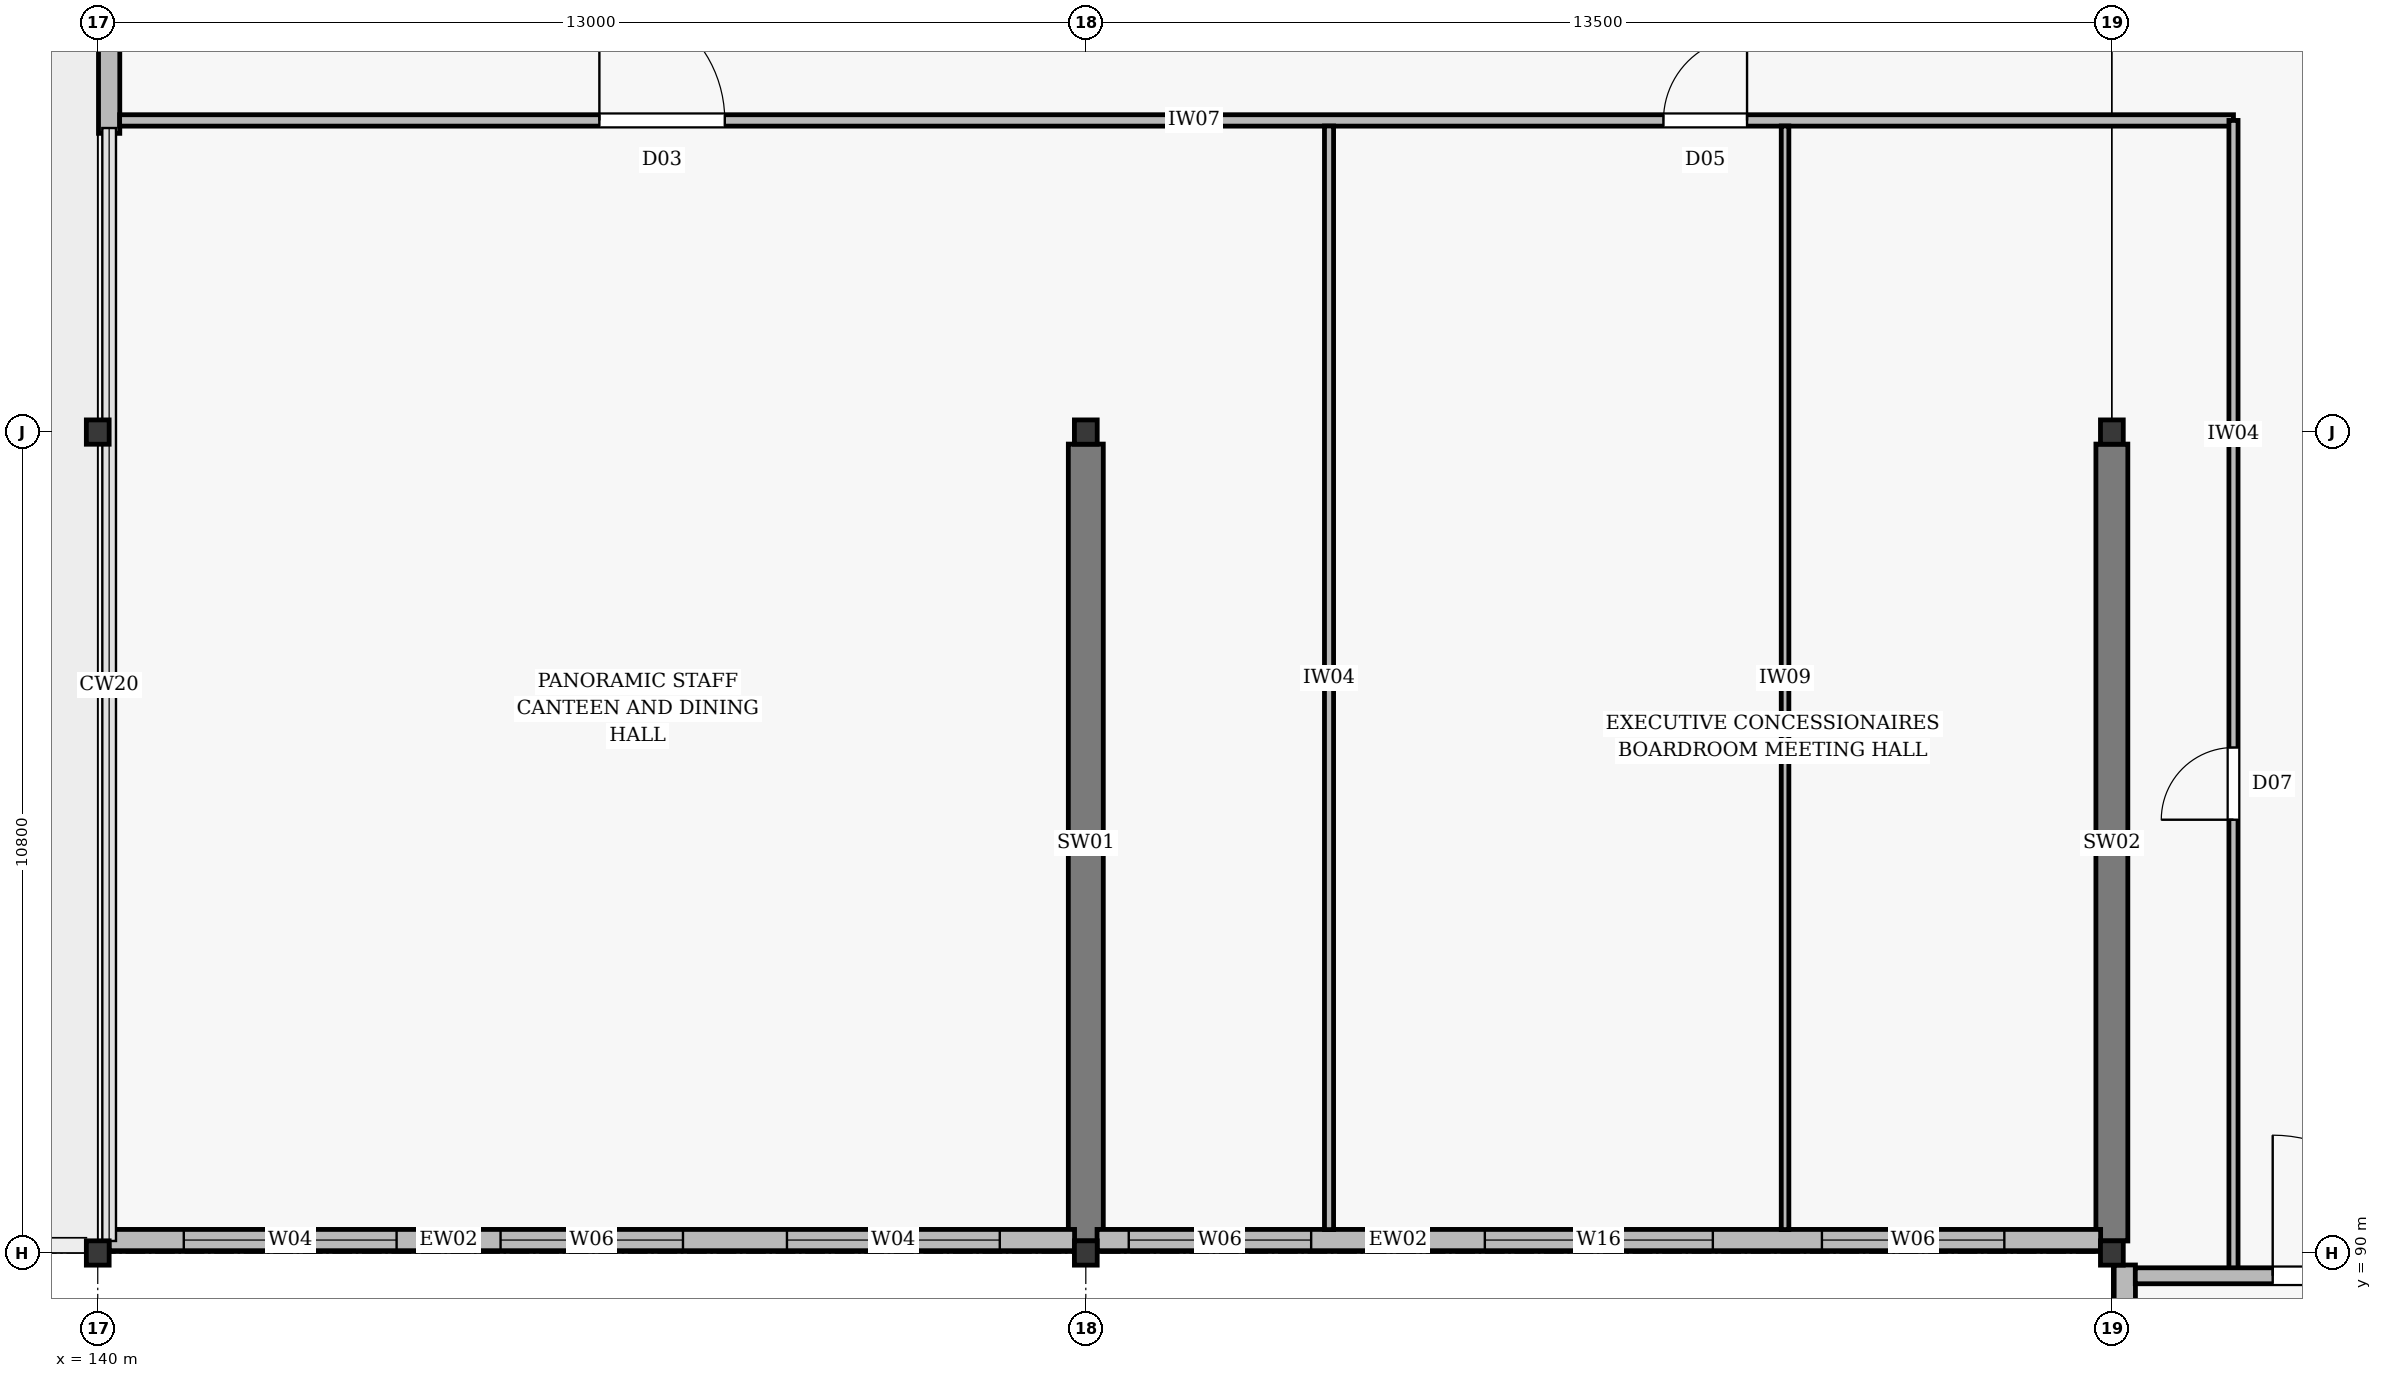
"""IFC4 building model, lengths in metres.
Left out: names, types, materials, properties, quantities, classifications, styles, units other than length and angle.
Written with IfcOpenShell. Run it as: python <this file> out.ifc"""

import sys

from ifc_helpers import new_model, si_unit, direction, frame, frame_2d, origin, origin_2d, place, context, subcontext, project, spatial, rectangle, i_section, extrude, element, fill, save


model = new_model("IFC4")
c1 = context("Model", 3, precision=1e-05, world=origin(), true_north=direction((0.0, 1.0)))
c2 = subcontext(c1, "Body", "Model", "MODEL_VIEW")
j1 = project(units=[si_unit("LENGTHUNIT", "METRE"), si_unit("PLANEANGLEUNIT", "RADIAN")], contexts=[c1])
p1 = place(None, origin())
s1 = spatial("IfcSite", under=j1, at=p1, CompositionType="ELEMENT")
p2 = place(p1, origin())
s2 = spatial("IfcBuilding", under=s1, at=p2, CompositionType="ELEMENT")
p3 = place(p2, frame((0.0, 0.0, 25.2)))
s3 = spatial("IfcBuildingStorey", under=s2, at=p3, CompositionType="ELEMENT", Elevation=25.2)
for number, where, z_axis, x_axis in (
    (1, (140.0, 90.0, 0.0), (0.0, 0.0, 1.0), (1.0, 0.0, 0.0)),
    (2, (140.0, 100.8, 0.0), (0.0, 0.0, 1.0), (1.0, 0.0, 0.0)),
    (3, (153.0, 90.0, 0.0), (0.0, 0.0, 1.0), (1.0, 0.0, 0.0)),
    (4, (153.0, 100.8, 0.0), (0.0, 0.0, 1.0), (1.0, 0.0, 0.0)),
    (5, (166.5, 90.0, 0.0), (0.0, 0.0, 1.0), (1.0, 0.0, 0.0)),
    (6, (166.5, 100.8, 0.0), (0.0, 0.0, 1.0), (1.0, 0.0, 0.0)),
):
    element("IfcColumn", number, at=place(p3, frame(where, z_axis=z_axis, x_axis=x_axis)), inside=s3, PredefinedType="COLUMN", context=c2, shape_type="SweptSolid", body=[
        extrude(i_section(OverallWidth=0.3, OverallDepth=0.32, WebThickness=0.011, FlangeThickness=0.021, at=origin_2d()), origin(), (0.0, 0.0, 1.0), 5.4),
    ])
p4 = place(p3, frame((153.0, 90.158, 0.0), z_axis=(0.0, 0.0, 1.0), x_axis=(0.0, 1.0, 0.0)))
e7 = element("IfcWall", 7, at=p4, inside=s3, PredefinedType="SHEAR", context=c2, shape_type="SweptSolid", body=[
    extrude(rectangle(XDim=10.484, YDim=0.46, at=frame_2d((5.242, 0.0))), origin(), (0.0, 0.0, 1.0), 5.24),
])
p5 = place(p3, frame((166.5, 90.158, 0.0), z_axis=(0.0, 0.0, 1.0), x_axis=(0.0, 1.0, 0.0)))
e8 = element("IfcWall", 8, at=p5, inside=s3, PredefinedType="SHEAR", context=c2, shape_type="SweptSolid", body=[
    extrude(rectangle(XDim=10.484, YDim=0.42, at=frame_2d((5.242, 0.0))), origin(), (0.0, 0.0, 1.0), 5.24),
])
p6 = place(p3, frame((140.148, 90.17, 0.0), z_axis=(0.0, 0.0, 1.0), x_axis=(1.0, 0.0, 0.0)))
e9 = element("IfcWall", 9, at=p6, inside=s3, PredefinedType="STANDARD", context=c2, shape_type="SweptSolid", body=[
    extrude(rectangle(XDim=12.704, YDim=0.28, at=frame_2d((6.352, 0.0))), origin(), (0.0, 0.0, 1.0), 4.65),
])
p7 = place(p6, frame((0.984, 0.0, 0.75)))
e10 = element("IfcOpeningElement", 10, at=p7, cuts=e9, PredefinedType="OPENING", context=c2, shape_type="SweptSolid", body=[
    extrude(rectangle(XDim=2.8, YDim=2.6, at=frame_2d((1.4, 1.3))), frame((0.0, 0.152, 0.0), z_axis=(0.0, -1.0, 0.0), x_axis=(1.0, 0.0, 0.0)), (0.0, 0.0, 1.0), 0.304),
])
p8 = place(p6, frame((5.152, 0.0, 0.75)))
e11 = element("IfcOpeningElement", 11, at=p8, cuts=e9, PredefinedType="OPENING", context=c2, shape_type="SweptSolid", body=[
    extrude(rectangle(XDim=2.4, YDim=2.4, at=frame_2d((1.2, 1.2))), frame((0.0, 0.152, 0.0), z_axis=(0.0, -1.0, 0.0), x_axis=(1.0, 0.0, 0.0)), (0.0, 0.0, 1.0), 0.304),
])
p9 = place(p6, frame((8.92, 0.0, 0.75)))
e12 = element("IfcOpeningElement", 12, at=p9, cuts=e9, PredefinedType="OPENING", context=c2, shape_type="SweptSolid", body=[
    extrude(rectangle(XDim=2.8, YDim=2.6, at=frame_2d((1.4, 1.3))), frame((0.0, 0.152, 0.0), z_axis=(0.0, -1.0, 0.0), x_axis=(1.0, 0.0, 0.0)), (0.0, 0.0, 1.0), 0.304),
])
p10 = place(p3, frame((153.148, 90.17, 0.0), z_axis=(0.0, 0.0, 1.0), x_axis=(1.0, 0.0, 0.0)))
e13 = element("IfcWall", 13, at=p10, inside=s3, PredefinedType="STANDARD", context=c2, shape_type="SweptSolid", body=[
    extrude(rectangle(XDim=13.204, YDim=0.28, at=frame_2d((6.602, 0.0))), origin(), (0.0, 0.0, 1.0), 4.65),
])
p11 = place(p10, frame((0.417, 0.0, 0.75)))
e14 = element("IfcOpeningElement", 14, at=p11, cuts=e13, PredefinedType="OPENING", context=c2, shape_type="SweptSolid", body=[
    extrude(rectangle(XDim=2.4, YDim=2.4, at=frame_2d((1.2, 1.2))), frame((0.0, 0.152, 0.0), z_axis=(0.0, -1.0, 0.0), x_axis=(1.0, 0.0, 0.0)), (0.0, 0.0, 1.0), 0.304),
])
p12 = place(p10, frame((5.102, 0.0, 1.05)))
e15 = element("IfcOpeningElement", 15, at=p12, cuts=e13, PredefinedType="OPENING", context=c2, shape_type="SweptSolid", body=[
    extrude(rectangle(XDim=3.0, YDim=1.2, at=frame_2d((1.5, 0.6))), frame((0.0, 0.152, 0.0), z_axis=(0.0, -1.0, 0.0), x_axis=(1.0, 0.0, 0.0)), (0.0, 0.0, 1.0), 0.304),
])
p13 = place(p10, frame((9.537, 0.0, 0.75)))
e16 = element("IfcOpeningElement", 16, at=p13, cuts=e13, PredefinedType="OPENING", context=c2, shape_type="SweptSolid", body=[
    extrude(rectangle(XDim=2.4, YDim=2.4, at=frame_2d((1.2, 1.2))), frame((0.0, 0.152, 0.0), z_axis=(0.0, -1.0, 0.0), x_axis=(1.0, 0.0, 0.0)), (0.0, 0.0, 1.0), 0.304),
])
p14 = place(p3, frame((166.67, 79.358, 0.0), z_axis=(0.0, 0.0, 1.0), x_axis=(0.0, 1.0, 0.0)))
e17 = element("IfcWall", 17, at=p14, inside=s3, PredefinedType="STANDARD", context=c2, shape_type="SweptSolid", body=[
    extrude(rectangle(XDim=10.484, YDim=0.28, at=frame_2d((5.242, 0.0))), origin(), (0.0, 0.0, 1.0), 4.65),
])
p15 = place(p14, frame((1.921, 0.0, 0.75)))
e18 = element("IfcOpeningElement", 18, at=p15, cuts=e17, PredefinedType="OPENING", context=c2, shape_type="SweptSolid", body=[
    extrude(rectangle(XDim=1.8, YDim=2.2, at=frame_2d((0.9, 1.1))), frame((0.0, 0.152, 0.0), z_axis=(0.0, -1.0, 0.0), x_axis=(1.0, 0.0, 0.0)), (0.0, 0.0, 1.0), 0.304),
])
p16 = place(p14, frame((6.763, 0.0, 0.75)))
e19 = element("IfcOpeningElement", 19, at=p16, cuts=e17, PredefinedType="OPENING", context=c2, shape_type="SweptSolid", body=[
    extrude(rectangle(XDim=1.8, YDim=2.2, at=frame_2d((0.9, 1.1))), frame((0.0, 0.152, 0.0), z_axis=(0.0, -1.0, 0.0), x_axis=(1.0, 0.0, 0.0)), (0.0, 0.0, 1.0), 0.304),
])
p17 = place(p3, frame((140.15, 104.73, 0.0), z_axis=(0.0, 0.0, 1.0), x_axis=(0.0, 1.0, 0.0)))
e20 = element("IfcWall", 20, at=p17, inside=s3, PredefinedType="STANDARD", context=c2, shape_type="SweptSolid", body=[
    extrude(rectangle(XDim=4.34, YDim=0.28, at=frame_2d((2.17, 0.0))), origin(), (0.0, 0.0, 1.0), 4.65),
])
p18 = place(p17, frame((1.1, 0.0, 0.005)))
e21 = element("IfcOpeningElement", 21, at=p18, cuts=e20, PredefinedType="OPENING", context=c2, shape_type="SweptSolid", body=[
    extrude(rectangle(XDim=2.1, YDim=2.3, at=frame_2d((1.05, 1.15))), frame((0.0, 0.152, 0.0), z_axis=(0.0, -1.0, 0.0), x_axis=(1.0, 0.0, 0.0)), (0.0, 0.0, 1.0), 0.304),
])
p19 = place(p3, frame((140.288, 104.9, 0.0), z_axis=(0.0, 0.0, 1.0), x_axis=(1.0, 0.0, 0.0)))
e22 = element("IfcWall", 22, at=p19, inside=s3, PredefinedType="PARTITIONING", context=c2, shape_type="SweptSolid", body=[
    extrude(rectangle(XDim=27.812, YDim=0.15, at=frame_2d((13.906, 0.0))), origin(), (0.0, 0.0, 1.0), 4.87),
])
p20 = place(p19, frame((6.312, 0.0, 0.005)))
e23 = element("IfcOpeningElement", 23, at=p20, cuts=e22, PredefinedType="OPENING", context=c2, shape_type="SweptSolid", body=[
    extrude(rectangle(XDim=1.65, YDim=2.2, at=frame_2d((0.825, 1.1))), frame((0.0, 0.087, 0.0), z_axis=(0.0, -1.0, 0.0), x_axis=(1.0, 0.0, 0.0)), (0.0, 0.0, 1.0), 0.174),
])
p21 = place(p19, frame((20.312, 0.0, 0.005)))
e24 = element("IfcOpeningElement", 24, at=p21, cuts=e22, PredefinedType="OPENING", context=c2, shape_type="SweptSolid", body=[
    extrude(rectangle(XDim=1.1, YDim=2.1, at=frame_2d((0.55, 1.05))), frame((0.0, 0.087, 0.0), z_axis=(0.0, -1.0, 0.0), x_axis=(1.0, 0.0, 0.0)), (0.0, 0.0, 1.0), 0.174),
])
p22 = place(p3, frame((156.2, 90.308, 0.0), z_axis=(0.0, 0.0, 1.0), x_axis=(0.0, 1.0, 0.0)))
e25 = element("IfcWall", 25, at=p22, inside=s3, PredefinedType="PARTITIONING", context=c2, shape_type="SweptSolid", body=[
    extrude(rectangle(XDim=14.519, YDim=0.12, at=frame_2d((7.259, 0.0))), origin(), (0.0, 0.0, 1.0), 4.68),
])
p23 = place(p3, frame((168.1, 89.7, 0.0), z_axis=(0.0, 0.0, 1.0), x_axis=(0.0, 1.0, 0.0)))
e26 = element("IfcWall", 26, at=p23, inside=s3, PredefinedType="PARTITIONING", context=c2, shape_type="SweptSolid", body=[
    extrude(rectangle(XDim=15.2, YDim=0.12, at=frame_2d((7.6, 0.0))), origin(), (0.0, 0.0, 1.0), 4.68),
])
p24 = place(p23, frame((6.0, 0.0, 0.005)))
e27 = element("IfcOpeningElement", 27, at=p24, cuts=e26, PredefinedType="OPENING", context=c2, shape_type="SweptSolid", body=[
    extrude(rectangle(XDim=0.95, YDim=2.1, at=frame_2d((0.475, 1.05))), frame((0.0, 0.072, 0.0), z_axis=(0.0, -1.0, 0.0), x_axis=(1.0, 0.0, 0.0)), (0.0, 0.0, 1.0), 0.144),
])
p25 = place(p3, frame((166.808, 89.7, 0.0), z_axis=(0.0, 0.0, 1.0), x_axis=(1.0, 0.0, 0.0)))
e28 = element("IfcWall", 28, at=p25, inside=s3, PredefinedType="PARTITIONING", context=c2, shape_type="SweptSolid", body=[
    extrude(rectangle(XDim=5.492, YDim=0.21, at=frame_2d((2.746, 0.0))), origin(), (0.0, 0.0, 1.0), 4.68),
])
p26 = place(p25, frame((1.808, 0.0, 0.005)))
e29 = element("IfcOpeningElement", 29, at=p26, cuts=e28, PredefinedType="OPENING", context=c2, shape_type="SweptSolid", body=[
    extrude(rectangle(XDim=1.85, YDim=2.35, at=frame_2d((0.925, 1.175))), frame((0.0, 0.117, 0.0), z_axis=(0.0, -1.0, 0.0), x_axis=(1.0, 0.0, 0.0)), (0.0, 0.0, 1.0), 0.234),
])
p27 = place(p3, frame((162.2, 90.308, 0.0), z_axis=(0.0, 0.0, 1.0), x_axis=(0.0, 1.0, 0.0)))
e30 = element("IfcWall", 30, at=p27, inside=s3, PredefinedType="MOVABLE", context=c2, shape_type="SweptSolid", body=[
    extrude(rectangle(XDim=14.519, YDim=0.1, at=frame_2d((7.259, 0.0))), origin(), (0.0, 0.0, 1.0), 4.68),
])
p28 = place(p7, origin())
e31 = element("IfcWindow", 31, at=p28, inside=s3, PartitioningType="DOUBLE_PANEL_VERTICAL", PredefinedType="WINDOW", context=c2, shape_type="SweptSolid", body=[
    extrude(rectangle(XDim=2.8, YDim=2.6, at=frame_2d((1.4, 1.3))), frame((0.0, 0.03, 0.0), z_axis=(0.0, -1.0, 0.0), x_axis=(1.0, 0.0, 0.0)), (0.0, 0.0, 1.0), 0.06),
])
fill(e10, e31)
p29 = place(p8, origin())
e32 = element("IfcWindow", 32, at=p29, inside=s3, PartitioningType="DOUBLE_PANEL_VERTICAL", PredefinedType="WINDOW", context=c2, shape_type="SweptSolid", body=[
    extrude(rectangle(XDim=2.4, YDim=2.4, at=frame_2d((1.2, 1.2))), frame((0.0, 0.03, 0.0), z_axis=(0.0, -1.0, 0.0), x_axis=(1.0, 0.0, 0.0)), (0.0, 0.0, 1.0), 0.06),
])
fill(e11, e32)
p30 = place(p9, origin())
e33 = element("IfcWindow", 33, at=p30, inside=s3, PartitioningType="DOUBLE_PANEL_VERTICAL", PredefinedType="WINDOW", context=c2, shape_type="SweptSolid", body=[
    extrude(rectangle(XDim=2.8, YDim=2.6, at=frame_2d((1.4, 1.3))), frame((0.0, 0.03, 0.0), z_axis=(0.0, -1.0, 0.0), x_axis=(1.0, 0.0, 0.0)), (0.0, 0.0, 1.0), 0.06),
])
fill(e12, e33)
p31 = place(p11, origin())
e34 = element("IfcWindow", 34, at=p31, inside=s3, PartitioningType="DOUBLE_PANEL_VERTICAL", PredefinedType="WINDOW", context=c2, shape_type="SweptSolid", body=[
    extrude(rectangle(XDim=2.4, YDim=2.4, at=frame_2d((1.2, 1.2))), frame((0.0, 0.03, 0.0), z_axis=(0.0, -1.0, 0.0), x_axis=(1.0, 0.0, 0.0)), (0.0, 0.0, 1.0), 0.06),
])
fill(e14, e34)
p32 = place(p12, origin())
e35 = element("IfcWindow", 35, at=p32, inside=s3, PartitioningType="DOUBLE_PANEL_VERTICAL", PredefinedType="WINDOW", context=c2, shape_type="SweptSolid", body=[
    extrude(rectangle(XDim=3.0, YDim=1.2, at=frame_2d((1.5, 0.6))), frame((0.0, 0.03, 0.0), z_axis=(0.0, -1.0, 0.0), x_axis=(1.0, 0.0, 0.0)), (0.0, 0.0, 1.0), 0.06),
])
fill(e15, e35)
p33 = place(p13, origin())
e36 = element("IfcWindow", 36, at=p33, inside=s3, PartitioningType="DOUBLE_PANEL_VERTICAL", PredefinedType="WINDOW", context=c2, shape_type="SweptSolid", body=[
    extrude(rectangle(XDim=2.4, YDim=2.4, at=frame_2d((1.2, 1.2))), frame((0.0, 0.03, 0.0), z_axis=(0.0, -1.0, 0.0), x_axis=(1.0, 0.0, 0.0)), (0.0, 0.0, 1.0), 0.06),
])
fill(e16, e36)
p34 = place(p2, frame((0.0, 0.0, 30.6)))
p35 = place(p34, frame((0.0, 0.0, -0.16)))
p36 = place(p35, frame((147.0, 97.5, 0.0)))
p37 = place(p36, frame((0.0, 0.0, 0.105)))
e37 = element("IfcWindow", 37, at=p37, inside=s3, PartitioningType="SINGLE_PANEL", PredefinedType="SKYLIGHT", context=c2, shape_type="SweptSolid", body=[
    extrude(rectangle(XDim=2.8, YDim=2.0, at=origin_2d()), origin(), (0.0, 0.0, 1.0), 0.05),
])
p38 = place(p35, frame((159.5, 97.5, 0.0)))
p39 = place(p38, frame((0.0, 0.0, 0.105)))
e38 = element("IfcWindow", 38, at=p39, inside=s3, PartitioningType="SINGLE_PANEL", PredefinedType="SKYLIGHT", context=c2, shape_type="SweptSolid", body=[
    extrude(rectangle(XDim=2.4, YDim=1.8, at=origin_2d()), origin(), (0.0, 0.0, 1.0), 0.05),
])
p40 = place(p20, origin())
e39 = element("IfcDoor", 39, at=p40, inside=s3, OperationType="DOUBLE_DOOR_SINGLE_SWING", PredefinedType="DOOR", context=c2, shape_type="SweptSolid", body=[
    extrude(rectangle(XDim=1.65, YDim=2.2, at=frame_2d((0.825, 1.1))), frame((0.0, 0.025, 0.0), z_axis=(0.0, -1.0, 0.0), x_axis=(1.0, 0.0, 0.0)), (0.0, 0.0, 1.0), 0.05),
])
fill(e23, e39)
p41 = place(p21, origin())
e40 = element("IfcDoor", 40, at=p41, inside=s3, OperationType="SINGLE_SWING_RIGHT", PredefinedType="DOOR", context=c2, shape_type="SweptSolid", body=[
    extrude(rectangle(XDim=1.1, YDim=2.1, at=frame_2d((0.55, 1.05))), frame((0.0, 0.025, 0.0), z_axis=(0.0, -1.0, 0.0), x_axis=(1.0, 0.0, 0.0)), (0.0, 0.0, 1.0), 0.05),
])
fill(e24, e40)
p42 = place(p24, origin())
e41 = element("IfcDoor", 41, at=p42, inside=s3, OperationType="SINGLE_SWING_LEFT", PredefinedType="DOOR", context=c2, shape_type="SweptSolid", body=[
    extrude(rectangle(XDim=0.95, YDim=2.1, at=frame_2d((0.475, 1.05))), frame((0.0, 0.025, 0.0), z_axis=(0.0, -1.0, 0.0), x_axis=(1.0, 0.0, 0.0)), (0.0, 0.0, 1.0), 0.05),
])
fill(e27, e41)
p43 = place(p26, origin())
e42 = element("IfcDoor", 42, at=p43, inside=s3, OperationType="DOUBLE_DOOR_SINGLE_SWING", PredefinedType="DOOR", context=c2, shape_type="SweptSolid", body=[
    extrude(rectangle(XDim=1.85, YDim=2.35, at=frame_2d((0.925, 1.175))), frame((0.0, 0.025, 0.0), z_axis=(0.0, -1.0, 0.0), x_axis=(1.0, 0.0, 0.0)), (0.0, 0.0, 1.0), 0.05),
])
fill(e29, e42)
save(model, sys.argv[1])
